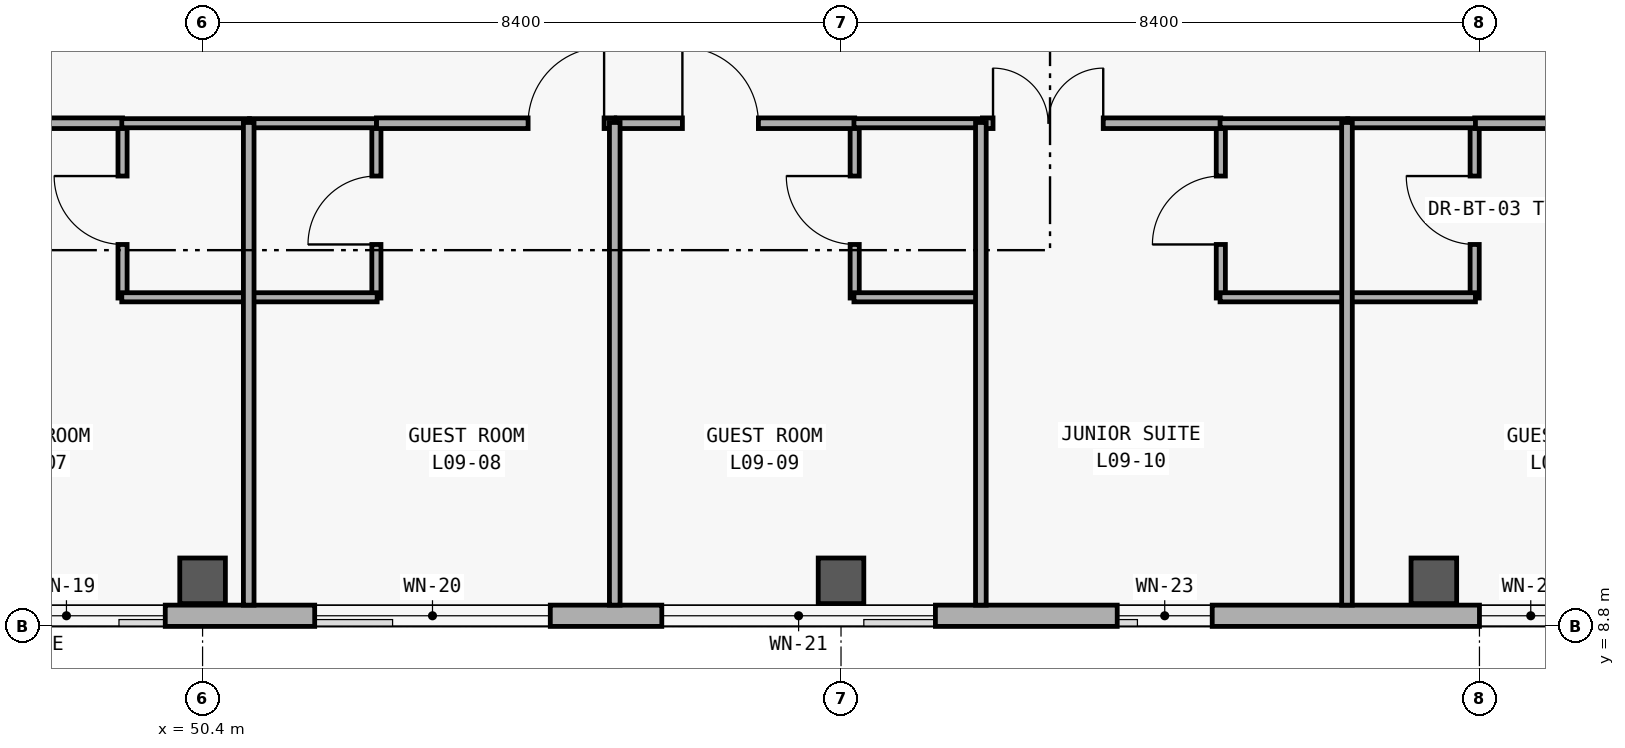
"""IFC4 building model, lengths in metres.
Left out: names, types, materials, properties, quantities, classifications, styles, units other than length and angle.
Written with IfcOpenShell. Run it as: python <this file> out.ifc"""

import sys

from ifc_helpers import new_model, si_unit, direction, frame, frame_2d, origin, origin_2d, place, context, subcontext, project, spatial, rectangle, extrude, element, fill, save


model = new_model("IFC4")
c1 = context("Model", 3, precision=1e-05, world=origin(), true_north=direction((0.0, 1.0)))
c2 = subcontext(c1, "Body", "Model", "MODEL_VIEW")
j1 = project(units=[si_unit("LENGTHUNIT", "METRE"), si_unit("PLANEANGLEUNIT", "RADIAN")], contexts=[c1])
p1 = place(None, origin())
s1 = spatial("IfcSite", under=j1, at=p1, CompositionType="ELEMENT")
p2 = place(p1, origin())
s2 = spatial("IfcBuilding", under=s1, at=p2, CompositionType="ELEMENT")
p3 = place(p2, frame((0.0, 0.0, 37.2)))
s3 = spatial("IfcBuildingStorey", under=s2, at=p3, CompositionType="ELEMENT", Elevation=37.2)
for number, where, z_axis, x_axis in (
    (1, (50.4, 9.4, 0.0), (0.0, 0.0, 1.0), (1.0, 0.0, 0.0)),
    (2, (58.8, 9.4, 0.0), (0.0, 0.0, 1.0), (1.0, 0.0, 0.0)),
    (3, (66.6, 9.4, 0.0), (0.0, 0.0, 1.0), (1.0, 0.0, 0.0)),
):
    element("IfcColumn", number, at=place(p3, frame(where, z_axis=z_axis, x_axis=x_axis)), inside=s3, PredefinedType="COLUMN", context=c2, shape_type="SweptSolid", body=[
        extrude(rectangle(XDim=0.6, YDim=0.6, at=origin_2d()), origin(), (0.0, 0.0, 1.0), 3.6),
    ])
p4 = place(p3, frame((75.32, 8.94, 0.0), z_axis=(0.0, 0.0, 1.0), x_axis=(-1.0, 0.0, 0.0)))
e4 = element("IfcWall", 4, at=p4, inside=s3, PredefinedType="SOLIDWALL", context=c2, shape_type="SweptSolid", body=[
    extrude(rectangle(XDim=58.24, YDim=0.28, at=frame_2d((29.12, 0.0))), origin(), (0.0, 0.0, 1.0), 3.34),
])
p5 = place(p4, frame((53.861, 0.0, 0.85)))
e5 = element("IfcOpeningElement", 5, at=p5, cuts=e4, PredefinedType="OPENING", context=c2, shape_type="SweptSolid", body=[
    extrude(rectangle(XDim=3.5, YDim=2.0, at=frame_2d((1.75, 1.0))), frame((0.0, 0.15, 0.0), z_axis=(0.0, -1.0, 0.0), x_axis=(1.0, 0.0, 0.0)), (0.0, 0.0, 1.0), 0.3),
])
p6 = place(p4, frame((50.095, 0.0, 0.85)))
e6 = element("IfcOpeningElement", 6, at=p6, cuts=e4, PredefinedType="OPENING", context=c2, shape_type="SweptSolid", body=[
    extrude(rectangle(XDim=1.4, YDim=1.6, at=frame_2d((0.7, 0.8))), frame((0.0, 0.15, 0.0), z_axis=(0.0, -1.0, 0.0), x_axis=(1.0, 0.0, 0.0)), (0.0, 0.0, 1.0), 0.3),
])
p7 = place(p4, frame((45.178, 0.0, 0.85)))
e7 = element("IfcOpeningElement", 7, at=p7, cuts=e4, PredefinedType="OPENING", context=c2, shape_type="SweptSolid", body=[
    extrude(rectangle(XDim=1.6, YDim=1.6, at=frame_2d((0.8, 0.8))), frame((0.0, 0.15, 0.0), z_axis=(0.0, -1.0, 0.0), x_axis=(1.0, 0.0, 0.0)), (0.0, 0.0, 1.0), 0.3),
])
p8 = place(p4, frame((40.261, 0.0, 0.85)))
e8 = element("IfcOpeningElement", 8, at=p8, cuts=e4, PredefinedType="OPENING", context=c2, shape_type="SweptSolid", body=[
    extrude(rectangle(XDim=1.8, YDim=1.6, at=frame_2d((0.9, 0.8))), frame((0.0, 0.15, 0.0), z_axis=(0.0, -1.0, 0.0), x_axis=(1.0, 0.0, 0.0)), (0.0, 0.0, 1.0), 0.3),
])
p9 = place(p4, frame((35.345, 0.0, 0.85)))
e9 = element("IfcOpeningElement", 9, at=p9, cuts=e4, PredefinedType="OPENING", context=c2, shape_type="SweptSolid", body=[
    extrude(rectangle(XDim=2.0, YDim=1.65, at=frame_2d((1.0, 0.825))), frame((0.0, 0.15, 0.0), z_axis=(0.0, -1.0, 0.0), x_axis=(1.0, 0.0, 0.0)), (0.0, 0.0, 1.0), 0.3),
])
p10 = place(p4, frame((30.428, 0.0, 0.85)))
e10 = element("IfcOpeningElement", 10, at=p10, cuts=e4, PredefinedType="OPENING", context=c2, shape_type="SweptSolid", body=[
    extrude(rectangle(XDim=2.2, YDim=1.65, at=frame_2d((1.1, 0.825))), frame((0.0, 0.15, 0.0), z_axis=(0.0, -1.0, 0.0), x_axis=(1.0, 0.0, 0.0)), (0.0, 0.0, 1.0), 0.3),
])
p11 = place(p4, frame((25.411, 0.0, 0.85)))
e11 = element("IfcOpeningElement", 11, at=p11, cuts=e4, PredefinedType="OPENING", context=c2, shape_type="SweptSolid", body=[
    extrude(rectangle(XDim=2.6, YDim=2.2, at=frame_2d((1.3, 1.1))), frame((0.0, 0.15, 0.0), z_axis=(0.0, -1.0, 0.0), x_axis=(1.0, 0.0, 0.0)), (0.0, 0.0, 1.0), 0.3),
])
p12 = place(p4, frame((20.345, 0.0, 0.85)))
e12 = element("IfcOpeningElement", 12, at=p12, cuts=e4, PredefinedType="OPENING", context=c2, shape_type="SweptSolid", body=[
    extrude(rectangle(XDim=3.1, YDim=2.2, at=frame_2d((1.55, 1.1))), frame((0.0, 0.15, 0.0), z_axis=(0.0, -1.0, 0.0), x_axis=(1.0, 0.0, 0.0)), (0.0, 0.0, 1.0), 0.3),
])
p13 = place(p4, frame((15.278, 0.0, 0.85)))
e13 = element("IfcOpeningElement", 13, at=p13, cuts=e4, PredefinedType="OPENING", context=c2, shape_type="SweptSolid", body=[
    extrude(rectangle(XDim=3.6, YDim=2.3, at=frame_2d((1.8, 1.15))), frame((0.0, 0.15, 0.0), z_axis=(0.0, -1.0, 0.0), x_axis=(1.0, 0.0, 0.0)), (0.0, 0.0, 1.0), 0.3),
])
p14 = place(p4, frame((11.636, 0.0, 0.85)))
e14 = element("IfcOpeningElement", 14, at=p14, cuts=e4, PredefinedType="OPENING", context=c2, shape_type="SweptSolid", body=[
    extrude(rectangle(XDim=1.25, YDim=1.45, at=frame_2d((0.625, 0.725))), frame((0.0, 0.15, 0.0), z_axis=(0.0, -1.0, 0.0), x_axis=(1.0, 0.0, 0.0)), (0.0, 0.0, 1.0), 0.3),
])
p15 = place(p4, frame((6.77, 0.0, 0.85)))
e15 = element("IfcOpeningElement", 15, at=p15, cuts=e4, PredefinedType="OPENING", context=c2, shape_type="SweptSolid", body=[
    extrude(rectangle(XDim=1.35, YDim=1.55, at=frame_2d((0.675, 0.775))), frame((0.0, 0.15, 0.0), z_axis=(0.0, -1.0, 0.0), x_axis=(1.0, 0.0, 0.0)), (0.0, 0.0, 1.0), 0.3),
])
p16 = place(p4, frame((1.904, 0.0, 0.85)))
e16 = element("IfcOpeningElement", 16, at=p16, cuts=e4, PredefinedType="OPENING", context=c2, shape_type="SweptSolid", body=[
    extrude(rectangle(XDim=1.45, YDim=1.65, at=frame_2d((0.725, 0.825))), frame((0.0, 0.15, 0.0), z_axis=(0.0, -1.0, 0.0), x_axis=(1.0, 0.0, 0.0)), (0.0, 0.0, 1.0), 0.3),
])
p17 = place(p3, frame((49.347, 13.12, 0.0), z_axis=(0.0, 0.0, 1.0), x_axis=(0.0, 1.0, 0.0)))
e17 = element("IfcWall", 17, at=p17, inside=s3, PredefinedType="PARTITIONING", context=c2, shape_type="SweptSolid", body=[
    extrude(rectangle(XDim=2.31, YDim=0.12, at=frame_2d((1.155, 0.0))), origin(), (0.0, 0.0, 1.0), 2.48),
])
p18 = place(p17, frame((0.705, 0.0, 0.0)))
e18 = element("IfcOpeningElement", 18, at=p18, cuts=e17, PredefinedType="OPENING", context=c2, shape_type="SweptSolid", body=[
    extrude(rectangle(XDim=0.9, YDim=2.18, at=frame_2d((0.45, 1.09))), frame((0.0, 0.07, 0.0), z_axis=(0.0, -1.0, 0.0), x_axis=(1.0, 0.0, 0.0)), (0.0, 0.0, 1.0), 0.14),
])
p19 = place(p3, frame((52.687, 13.12, 0.0), z_axis=(0.0, 0.0, 1.0), x_axis=(0.0, 1.0, 0.0)))
e19 = element("IfcWall", 19, at=p19, inside=s3, PredefinedType="PARTITIONING", context=c2, shape_type="SweptSolid", body=[
    extrude(rectangle(XDim=2.31, YDim=0.12, at=frame_2d((1.155, 0.0))), origin(), (0.0, 0.0, 1.0), 2.48),
])
p20 = place(p19, frame((0.705, 0.0, 0.0)))
e20 = element("IfcOpeningElement", 20, at=p20, cuts=e19, PredefinedType="OPENING", context=c2, shape_type="SweptSolid", body=[
    extrude(rectangle(XDim=0.9, YDim=2.18, at=frame_2d((0.45, 1.09))), frame((0.0, 0.07, 0.0), z_axis=(0.0, -1.0, 0.0), x_axis=(1.0, 0.0, 0.0)), (0.0, 0.0, 1.0), 0.14),
])
p21 = place(p3, frame((58.98, 13.12, 0.0), z_axis=(0.0, 0.0, 1.0), x_axis=(0.0, 1.0, 0.0)))
e21 = element("IfcWall", 21, at=p21, inside=s3, PredefinedType="PARTITIONING", context=c2, shape_type="SweptSolid", body=[
    extrude(rectangle(XDim=2.31, YDim=0.12, at=frame_2d((1.155, 0.0))), origin(), (0.0, 0.0, 1.0), 2.48),
])
p22 = place(p21, frame((0.705, 0.0, 0.0)))
e22 = element("IfcOpeningElement", 22, at=p22, cuts=e21, PredefinedType="OPENING", context=c2, shape_type="SweptSolid", body=[
    extrude(rectangle(XDim=0.9, YDim=2.18, at=frame_2d((0.45, 1.09))), frame((0.0, 0.07, 0.0), z_axis=(0.0, -1.0, 0.0), x_axis=(1.0, 0.0, 0.0)), (0.0, 0.0, 1.0), 0.14),
])
p23 = place(p3, frame((63.797, 13.12, 0.0), z_axis=(0.0, 0.0, 1.0), x_axis=(0.0, 1.0, 0.0)))
e23 = element("IfcWall", 23, at=p23, inside=s3, PredefinedType="PARTITIONING", context=c2, shape_type="SweptSolid", body=[
    extrude(rectangle(XDim=2.31, YDim=0.12, at=frame_2d((1.155, 0.0))), origin(), (0.0, 0.0, 1.0), 2.48),
])
p24 = place(p23, frame((0.705, 0.0, 0.0)))
e24 = element("IfcOpeningElement", 24, at=p24, cuts=e23, PredefinedType="OPENING", context=c2, shape_type="SweptSolid", body=[
    extrude(rectangle(XDim=0.9, YDim=2.18, at=frame_2d((0.45, 1.09))), frame((0.0, 0.07, 0.0), z_axis=(0.0, -1.0, 0.0), x_axis=(1.0, 0.0, 0.0)), (0.0, 0.0, 1.0), 0.14),
])
p25 = place(p3, frame((67.137, 13.12, 0.0), z_axis=(0.0, 0.0, 1.0), x_axis=(0.0, 1.0, 0.0)))
e25 = element("IfcWall", 25, at=p25, inside=s3, PredefinedType="PARTITIONING", context=c2, shape_type="SweptSolid", body=[
    extrude(rectangle(XDim=2.31, YDim=0.12, at=frame_2d((1.155, 0.0))), origin(), (0.0, 0.0, 1.0), 2.48),
])
p26 = place(p25, frame((0.705, 0.0, 0.0)))
e26 = element("IfcOpeningElement", 26, at=p26, cuts=e25, PredefinedType="OPENING", context=c2, shape_type="SweptSolid", body=[
    extrude(rectangle(XDim=0.9, YDim=2.18, at=frame_2d((0.45, 1.09))), frame((0.0, 0.07, 0.0), z_axis=(0.0, -1.0, 0.0), x_axis=(1.0, 0.0, 0.0)), (0.0, 0.0, 1.0), 0.14),
])
p27 = place(p3, frame((46.21, 15.42, 0.0), z_axis=(0.0, 0.0, 1.0), x_axis=(1.0, 0.0, 0.0)))
e27 = element("IfcWall", 27, at=p27, inside=s3, PredefinedType="PARTITIONING", context=c2, shape_type="SweptSolid", body=[
    extrude(rectangle(XDim=3.137, YDim=0.14, at=frame_2d((1.568, 0.0))), origin(), (0.0, 0.0, 1.0), 2.48),
])
p28 = place(p27, frame((0.936, 0.0, 0.0)))
e28 = element("IfcOpeningElement", 28, at=p28, cuts=e27, PredefinedType="OPENING", context=c2, shape_type="SweptSolid", body=[
    extrude(rectangle(XDim=1.0, YDim=2.28, at=frame_2d((0.5, 1.14))), frame((0.0, 0.08, 0.0), z_axis=(0.0, -1.0, 0.0), x_axis=(1.0, 0.0, 0.0)), (0.0, 0.0, 1.0), 0.16),
])
p29 = place(p3, frame((52.687, 15.42, 0.0), z_axis=(0.0, 0.0, 1.0), x_axis=(1.0, 0.0, 0.0)))
e29 = element("IfcWall", 29, at=p29, inside=s3, PredefinedType="PARTITIONING", context=c2, shape_type="SweptSolid", body=[
    extrude(rectangle(XDim=3.136, YDim=0.14, at=frame_2d((1.568, 0.0))), origin(), (0.0, 0.0, 1.0), 2.48),
])
p30 = place(p29, frame((1.996, 0.0, 0.0)))
e30 = element("IfcOpeningElement", 30, at=p30, cuts=e29, PredefinedType="OPENING", context=c2, shape_type="SweptSolid", body=[
    extrude(rectangle(XDim=1.0, YDim=2.28, at=frame_2d((0.5, 1.14))), frame((0.0, 0.08, 0.0), z_axis=(0.0, -1.0, 0.0), x_axis=(1.0, 0.0, 0.0)), (0.0, 0.0, 1.0), 0.16),
])
p31 = place(p3, frame((55.843, 15.42, 0.0), z_axis=(0.0, 0.0, 1.0), x_axis=(1.0, 0.0, 0.0)))
e31 = element("IfcWall", 31, at=p31, inside=s3, PredefinedType="PARTITIONING", context=c2, shape_type="SweptSolid", body=[
    extrude(rectangle(XDim=3.137, YDim=0.14, at=frame_2d((1.568, 0.0))), origin(), (0.0, 0.0, 1.0), 2.48),
])
p32 = place(p31, frame((0.87, 0.0, 0.0)))
e32 = element("IfcOpeningElement", 32, at=p32, cuts=e31, PredefinedType="OPENING", context=c2, shape_type="SweptSolid", body=[
    extrude(rectangle(XDim=1.0, YDim=2.28, at=frame_2d((0.5, 1.14))), frame((0.0, 0.08, 0.0), z_axis=(0.0, -1.0, 0.0), x_axis=(1.0, 0.0, 0.0)), (0.0, 0.0, 1.0), 0.16),
])
p33 = place(p3, frame((60.66, 15.42, 0.0), z_axis=(0.0, 0.0, 1.0), x_axis=(1.0, 0.0, 0.0)))
e33 = element("IfcWall", 33, at=p33, inside=s3, PredefinedType="PARTITIONING", context=c2, shape_type="SweptSolid", body=[
    extrude(rectangle(XDim=3.137, YDim=0.14, at=frame_2d((1.569, 0.0))), origin(), (0.0, 0.0, 1.0), 2.48),
])
p34 = place(p33, frame((0.14, 0.0, 0.0)))
e34 = element("IfcOpeningElement", 34, at=p34, cuts=e33, PredefinedType="OPENING", context=c2, shape_type="SweptSolid", body=[
    extrude(rectangle(XDim=1.45, YDim=2.3, at=frame_2d((0.725, 1.15))), frame((0.0, 0.08, 0.0), z_axis=(0.0, -1.0, 0.0), x_axis=(1.0, 0.0, 0.0)), (0.0, 0.0, 1.0), 0.16),
])
p35 = place(p3, frame((67.137, 15.42, 0.0), z_axis=(0.0, 0.0, 1.0), x_axis=(1.0, 0.0, 0.0)))
e35 = element("IfcWall", 35, at=p35, inside=s3, PredefinedType="PARTITIONING", context=c2, shape_type="SweptSolid", body=[
    extrude(rectangle(XDim=3.136, YDim=0.14, at=frame_2d((1.568, 0.0))), origin(), (0.0, 0.0, 1.0), 2.48),
])
p36 = place(p35, frame((1.93, 0.0, 0.0)))
e36 = element("IfcOpeningElement", 36, at=p36, cuts=e35, PredefinedType="OPENING", context=c2, shape_type="SweptSolid", body=[
    extrude(rectangle(XDim=1.0, YDim=2.28, at=frame_2d((0.5, 1.14))), frame((0.0, 0.08, 0.0), z_axis=(0.0, -1.0, 0.0), x_axis=(1.0, 0.0, 0.0)), (0.0, 0.0, 1.0), 0.16),
])
for number, where, z_axis, x_axis in (
    (37, (49.337, 13.13, 0.0), (0.0, 0.0, 1.0), (1.0, 0.0, 0.0)),
    (38, (49.337, 15.42, 0.0), (0.0, 0.0, 1.0), (1.0, 0.0, 0.0)),
):
    element("IfcWall", number, at=place(p3, frame(where, z_axis=z_axis, x_axis=x_axis)), inside=s3, PredefinedType="PARTITIONING", context=c2, shape_type="SweptSolid", body=[
        extrude(rectangle(XDim=1.68, YDim=0.12, at=frame_2d((0.84, 0.0))), origin(), (0.0, 0.0, 1.0), 2.48),
    ])
p37 = place(p3, frame((51.017, 13.13, 0.0), z_axis=(0.0, 0.0, 1.0), x_axis=(1.0, 0.0, 0.0)))
e39 = element("IfcWall", 39, at=p37, inside=s3, PredefinedType="PARTITIONING", context=c2, shape_type="SweptSolid", body=[
    extrude(rectangle(XDim=1.68, YDim=0.12, at=frame_2d((0.84, 0.0))), origin(), (0.0, 0.0, 1.0), 2.48),
])
p38 = place(p3, frame((51.017, 15.42, 0.0), z_axis=(0.0, 0.0, 1.0), x_axis=(1.0, 0.0, 0.0)))
e40 = element("IfcWall", 40, at=p38, inside=s3, PredefinedType="PARTITIONING", context=c2, shape_type="SweptSolid", body=[
    extrude(rectangle(XDim=1.67, YDim=0.12, at=frame_2d((0.835, 0.0))), origin(), (0.0, 0.0, 1.0), 2.48),
])
for number, where, z_axis, x_axis in (
    (41, (58.97, 13.13, 0.0), (0.0, 0.0, 1.0), (1.0, 0.0, 0.0)),
    (42, (58.97, 15.42, 0.0), (0.0, 0.0, 1.0), (1.0, 0.0, 0.0)),
    (43, (63.787, 13.13, 0.0), (0.0, 0.0, 1.0), (1.0, 0.0, 0.0)),
    (44, (63.787, 15.42, 0.0), (0.0, 0.0, 1.0), (1.0, 0.0, 0.0)),
    (45, (65.467, 13.13, 0.0), (0.0, 0.0, 1.0), (1.0, 0.0, 0.0)),
    (46, (65.467, 15.42, 0.0), (0.0, 0.0, 1.0), (1.0, 0.0, 0.0)),
):
    element("IfcWall", number, at=place(p3, frame(where, z_axis=z_axis, x_axis=x_axis)), inside=s3, PredefinedType="PARTITIONING", context=c2, shape_type="SweptSolid", body=[
        extrude(rectangle(XDim=1.68, YDim=0.12, at=frame_2d((0.84, 0.0))), origin(), (0.0, 0.0, 1.0), 2.48),
    ])
for number, where, z_axis, x_axis in (
    (47, (51.007, 9.08, 0.0), (0.0, 0.0, 1.0), (0.0, 1.0, 0.0)),
    (48, (55.823, 9.08, 0.0), (0.0, 0.0, 1.0), (0.0, 1.0, 0.0)),
    (49, (60.64, 9.08, 0.0), (0.0, 0.0, 1.0), (0.0, 1.0, 0.0)),
    (50, (65.457, 9.08, 0.0), (0.0, 0.0, 1.0), (0.0, 1.0, 0.0)),
):
    element("IfcWall", number, at=place(p3, frame(where, z_axis=z_axis, x_axis=x_axis)), inside=s3, PredefinedType="PARTITIONING", context=c2, shape_type="SweptSolid", body=[
        extrude(rectangle(XDim=6.35, YDim=0.14, at=frame_2d((3.175, 0.0))), origin(), (0.0, 0.0, 1.0), 2.48),
    ])
p39 = place(p11, origin())
e51 = element("IfcWindow", 51, at=p39, inside=s3, PartitioningType="SINGLE_PANEL", PredefinedType="WINDOW", context=c2, shape_type="SweptSolid", body=[
    extrude(rectangle(XDim=2.6, YDim=2.2, at=frame_2d((1.3, 1.1))), frame((0.0, 0.03, 0.0), z_axis=(0.0, -1.0, 0.0), x_axis=(1.0, 0.0, 0.0)), (0.0, 0.0, 1.0), 0.06),
])
fill(e11, e51)
p40 = place(p12, origin())
e52 = element("IfcWindow", 52, at=p40, inside=s3, PartitioningType="SINGLE_PANEL", PredefinedType="WINDOW", context=c2, shape_type="SweptSolid", body=[
    extrude(rectangle(XDim=3.1, YDim=2.2, at=frame_2d((1.55, 1.1))), frame((0.0, 0.03, 0.0), z_axis=(0.0, -1.0, 0.0), x_axis=(1.0, 0.0, 0.0)), (0.0, 0.0, 1.0), 0.06),
])
fill(e12, e52)
p41 = place(p13, origin())
e53 = element("IfcWindow", 53, at=p41, inside=s3, PartitioningType="SINGLE_PANEL", PredefinedType="WINDOW", context=c2, shape_type="SweptSolid", body=[
    extrude(rectangle(XDim=3.6, YDim=2.3, at=frame_2d((1.8, 1.15))), frame((0.0, 0.03, 0.0), z_axis=(0.0, -1.0, 0.0), x_axis=(1.0, 0.0, 0.0)), (0.0, 0.0, 1.0), 0.06),
])
fill(e13, e53)
p42 = place(p14, origin())
e54 = element("IfcWindow", 54, at=p42, inside=s3, PartitioningType="SINGLE_PANEL", PredefinedType="WINDOW", context=c2, shape_type="SweptSolid", body=[
    extrude(rectangle(XDim=1.25, YDim=1.45, at=frame_2d((0.625, 0.725))), frame((0.0, 0.03, 0.0), z_axis=(0.0, -1.0, 0.0), x_axis=(1.0, 0.0, 0.0)), (0.0, 0.0, 1.0), 0.06),
])
fill(e14, e54)
p43 = place(p15, origin())
e55 = element("IfcWindow", 55, at=p43, inside=s3, PartitioningType="SINGLE_PANEL", PredefinedType="WINDOW", context=c2, shape_type="SweptSolid", body=[
    extrude(rectangle(XDim=1.35, YDim=1.55, at=frame_2d((0.675, 0.775))), frame((0.0, 0.03, 0.0), z_axis=(0.0, -1.0, 0.0), x_axis=(1.0, 0.0, 0.0)), (0.0, 0.0, 1.0), 0.06),
])
fill(e15, e55)
p44 = place(p18, origin())
e56 = element("IfcDoor", 56, at=p44, inside=s3, OperationType="SINGLE_SWING_RIGHT", PredefinedType="DOOR", context=c2, shape_type="SweptSolid", body=[
    extrude(rectangle(XDim=0.9, YDim=2.18, at=frame_2d((0.45, 1.09))), frame((0.0, 0.025, 0.0), z_axis=(0.0, -1.0, 0.0), x_axis=(1.0, 0.0, 0.0)), (0.0, 0.0, 1.0), 0.05),
])
fill(e18, e56)
p45 = place(p20, origin())
e57 = element("IfcDoor", 57, at=p45, inside=s3, OperationType="SINGLE_SWING_LEFT", PredefinedType="DOOR", context=c2, shape_type="SweptSolid", body=[
    extrude(rectangle(XDim=0.9, YDim=2.18, at=frame_2d((0.45, 1.09))), frame((0.0, 0.025, 0.0), z_axis=(0.0, -1.0, 0.0), x_axis=(1.0, 0.0, 0.0)), (0.0, 0.0, 1.0), 0.05),
])
fill(e20, e57)
p46 = place(p22, origin())
e58 = element("IfcDoor", 58, at=p46, inside=s3, OperationType="SINGLE_SWING_RIGHT", PredefinedType="DOOR", context=c2, shape_type="SweptSolid", body=[
    extrude(rectangle(XDim=0.9, YDim=2.18, at=frame_2d((0.45, 1.09))), frame((0.0, 0.025, 0.0), z_axis=(0.0, -1.0, 0.0), x_axis=(1.0, 0.0, 0.0)), (0.0, 0.0, 1.0), 0.05),
])
fill(e22, e58)
p47 = place(p24, origin())
e59 = element("IfcDoor", 59, at=p47, inside=s3, OperationType="SINGLE_SWING_LEFT", PredefinedType="DOOR", context=c2, shape_type="SweptSolid", body=[
    extrude(rectangle(XDim=0.9, YDim=2.18, at=frame_2d((0.45, 1.09))), frame((0.0, 0.025, 0.0), z_axis=(0.0, -1.0, 0.0), x_axis=(1.0, 0.0, 0.0)), (0.0, 0.0, 1.0), 0.05),
])
fill(e24, e59)
p48 = place(p26, origin())
e60 = element("IfcDoor", 60, at=p48, inside=s3, OperationType="SINGLE_SWING_RIGHT", PredefinedType="DOOR", context=c2, shape_type="SweptSolid", body=[
    extrude(rectangle(XDim=0.9, YDim=2.18, at=frame_2d((0.45, 1.09))), frame((0.0, 0.025, 0.0), z_axis=(0.0, -1.0, 0.0), x_axis=(1.0, 0.0, 0.0)), (0.0, 0.0, 1.0), 0.05),
])
fill(e26, e60)
p49 = place(p30, origin())
e61 = element("IfcDoor", 61, at=p49, inside=s3, OperationType="SINGLE_SWING_RIGHT", PredefinedType="DOOR", context=c2, shape_type="SweptSolid", body=[
    extrude(rectangle(XDim=1.0, YDim=2.28, at=frame_2d((0.5, 1.14))), frame((0.0, 0.025, 0.0), z_axis=(0.0, -1.0, 0.0), x_axis=(1.0, 0.0, 0.0)), (0.0, 0.0, 1.0), 0.05),
])
fill(e30, e61)
p50 = place(p32, origin())
e62 = element("IfcDoor", 62, at=p50, inside=s3, OperationType="SINGLE_SWING_LEFT", PredefinedType="DOOR", context=c2, shape_type="SweptSolid", body=[
    extrude(rectangle(XDim=1.0, YDim=2.28, at=frame_2d((0.5, 1.14))), frame((0.0, 0.025, 0.0), z_axis=(0.0, -1.0, 0.0), x_axis=(1.0, 0.0, 0.0)), (0.0, 0.0, 1.0), 0.05),
])
fill(e32, e62)
p51 = place(p34, origin())
e63 = element("IfcDoor", 63, at=p51, inside=s3, OperationType="DOUBLE_DOOR_SINGLE_SWING", PredefinedType="DOOR", context=c2, shape_type="SweptSolid", body=[
    extrude(rectangle(XDim=1.45, YDim=2.3, at=frame_2d((0.725, 1.15))), frame((0.0, 0.025, 0.0), z_axis=(0.0, -1.0, 0.0), x_axis=(1.0, 0.0, 0.0)), (0.0, 0.0, 1.0), 0.05),
])
fill(e34, e63)
save(model, sys.argv[1])
